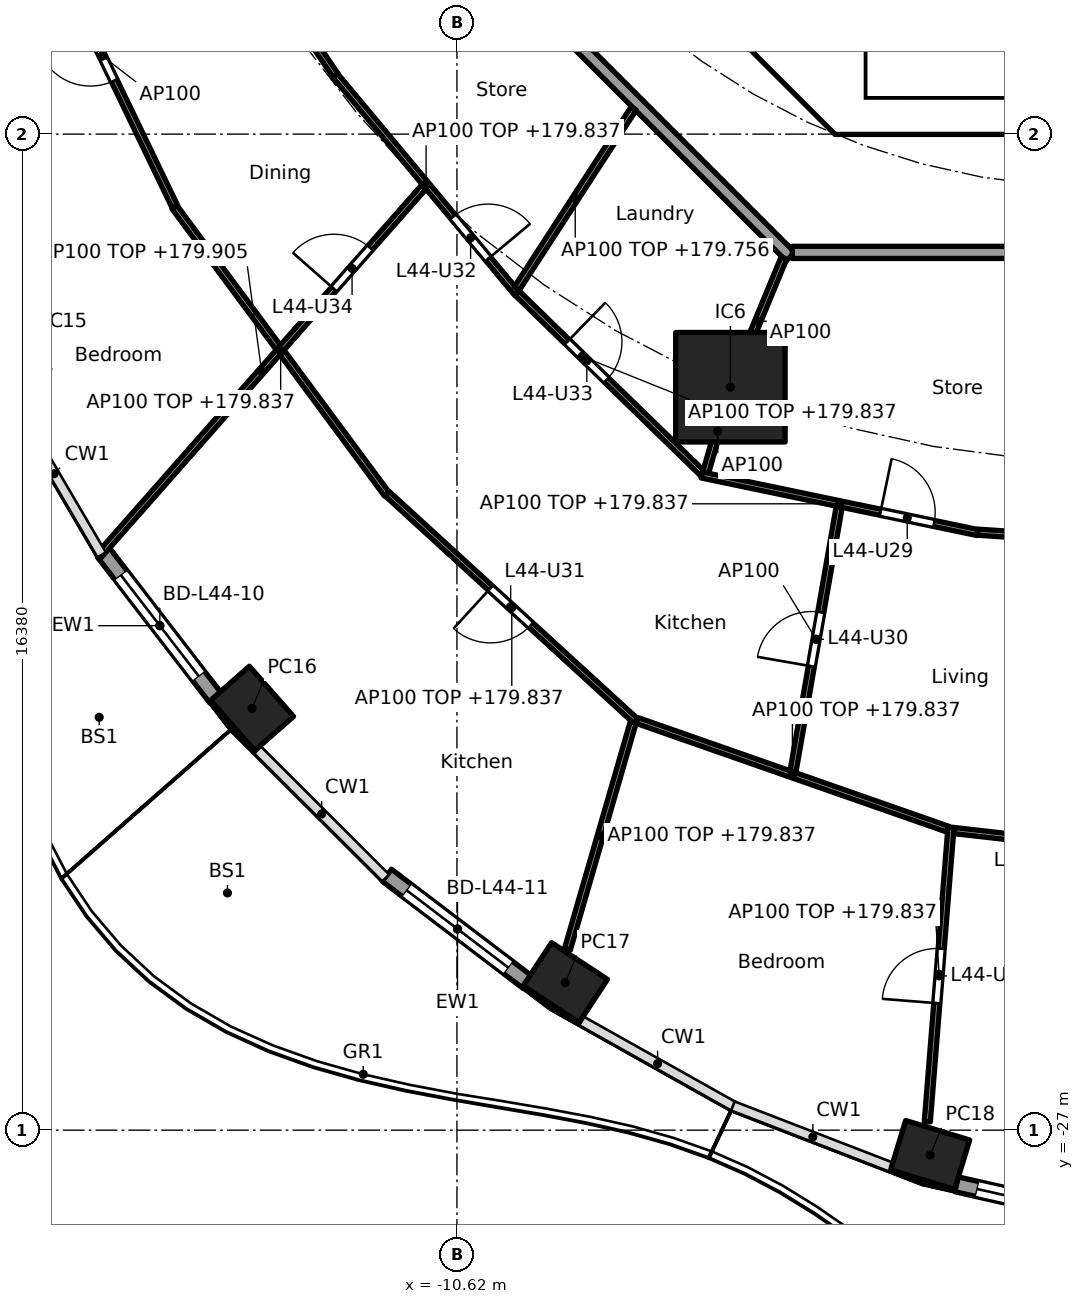
"""IFC4 building model, lengths in metres.
Left out: names, types, materials, properties, quantities, classifications, styles, units other than length and angle.
Written with IfcOpenShell. Run it as: python <this file> out.ifc"""

import sys

from ifc_helpers import new_model, si_unit, direction, frame, frame_2d, origin, origin_2d, place, context, subcontext, project, spatial, polyline, rectangle, hollow_rectangle, outline, extrude, element, fill, save


model = new_model("IFC4")
c1 = context("Model", 3, precision=1e-05, world=origin(), true_north=direction((0.0, 1.0)))
c2 = subcontext(c1, "Body", "Model", "MODEL_VIEW")
j1 = project(units=[si_unit("LENGTHUNIT", "METRE"), si_unit("PLANEANGLEUNIT", "RADIAN")], contexts=[c1])
p1 = place(None, origin())
s1 = spatial("IfcSite", under=j1, at=p1, CompositionType="ELEMENT")
p2 = place(p1, origin())
s2 = spatial("IfcBuilding", under=s1, at=p2, CompositionType="ELEMENT")
p3 = place(p2, frame((0.0, 0.0, 177.0)))
s3 = spatial("IfcBuildingStorey", under=s2, at=p3, CompositionType="ELEMENT", Elevation=177.0)
for number, where, z_axis, x_axis in (
    (1, (-13.989, -20.064, 0.0), (0.0, 0.0, 1.0), (0.66, -0.751, 0.0)),
    (2, (-8.837, -24.573, 0.0), (0.0, 0.0, 1.0), (0.836, -0.549, 0.0)),
    (3, (-2.838, -27.408, 0.0), (0.0, 0.0, 1.0), (0.957, -0.292, 0.0)),
):
    element("IfcColumn", number, at=place(p3, frame(where, z_axis=z_axis, x_axis=x_axis)), inside=s3, PredefinedType="COLUMN", context=c2, shape_type="SweptSolid", body=[
        extrude(hollow_rectangle(XDim=1.1, YDim=0.85, WallThickness=0.036, at=origin_2d()), origin(), (0.0, 0.0, 1.0), 3.7),
    ])
p4 = place(p3, frame((-6.123, -14.782, 0.0), z_axis=(0.0, 0.0, 1.0), x_axis=(1.0, 0.0, 0.0)))
e4 = element("IfcColumn", 4, at=p4, inside=s3, PredefinedType="COLUMN", context=c2, shape_type="SweptSolid", body=[
    extrude(rectangle(XDim=1.8, YDim=1.8, at=origin_2d()), origin(), (0.0, 0.0, 1.0), 3.7),
])
p5 = place(p3, frame((-14.58, -19.906, 0.0), z_axis=(0.0, 0.0, 1.0), x_axis=(-0.610437428894, 0.79206448311, 0.0)))
e5 = element("IfcWall", 5, at=p5, inside=s3, PredefinedType="SOLIDWALL", context=c2, shape_type="SweptSolid", body=[
    extrude(rectangle(XDim=3.035, YDim=0.25, at=frame_2d((1.518, 0.0))), origin(), (0.0, 0.0, 1.0), 3.44),
])
p6 = place(p5, frame((0.468, 0.0, 0.0)))
e6 = element("IfcOpeningElement", 6, at=p6, cuts=e5, PredefinedType="OPENING", context=c2, shape_type="SweptSolid", body=[
    extrude(rectangle(XDim=2.1, YDim=2.4, at=frame_2d((1.05, 1.2))), frame((0.0, 0.135, 0.0), z_axis=(0.0, -1.0, 0.0), x_axis=(1.0, 0.0, 0.0)), (0.0, 0.0, 1.0), 0.27),
])
p7 = place(p3, frame((-9.45, -24.574, 0.0), z_axis=(0.0, 0.0, 1.0), x_axis=(-0.796055733703, 0.60522332146, 0.0)))
e7 = element("IfcWall", 7, at=p7, inside=s3, PredefinedType="SOLIDWALL", context=c2, shape_type="SweptSolid", body=[
    extrude(rectangle(XDim=2.917, YDim=0.25, at=frame_2d((1.458, 0.0))), origin(), (0.0, 0.0, 1.0), 3.44),
])
p8 = place(p7, frame((0.408, 0.0, 0.0)))
e8 = element("IfcOpeningElement", 8, at=p8, cuts=e7, PredefinedType="OPENING", context=c2, shape_type="SweptSolid", body=[
    extrude(rectangle(XDim=2.1, YDim=2.4, at=frame_2d((1.05, 1.2))), frame((0.0, 0.135, 0.0), z_axis=(0.0, -1.0, 0.0), x_axis=(1.0, 0.0, 0.0)), (0.0, 0.0, 1.0), 0.27),
])
p9 = place(p3, frame((0.315, -28.506, 0.0), z_axis=(0.0, 0.0, 1.0), x_axis=(-0.975324329911, 0.220776926974, 0.0)))
e9 = element("IfcWall", 9, at=p9, inside=s3, PredefinedType="SOLIDWALL", context=c2, shape_type="SweptSolid", body=[
    extrude(rectangle(XDim=2.788, YDim=0.25, at=frame_2d((1.394, 0.0))), origin(), (0.0, 0.0, 1.0), 3.44),
])
p10 = place(p9, frame((0.344, 0.0, 0.0)))
e10 = element("IfcOpeningElement", 10, at=p10, cuts=e9, PredefinedType="OPENING", context=c2, shape_type="SweptSolid", body=[
    extrude(rectangle(XDim=2.1, YDim=2.4, at=frame_2d((1.05, 1.2))), frame((0.0, 0.135, 0.0), z_axis=(0.0, -1.0, 0.0), x_axis=(1.0, 0.0, 0.0)), (0.0, 0.0, 1.0), 0.27),
])
p11 = place(p3, frame((-9.988, -4.613, 0.0), z_axis=(0.0, 0.0, 1.0), x_axis=(0.707106781187, -0.707106781187, 0.0)))
e11 = element("IfcWall", 11, at=p11, inside=s3, PredefinedType="SHEAR", context=c2, shape_type="SweptSolid", body=[
    extrude(rectangle(XDim=7.602, YDim=0.6, at=frame_2d((3.801, 0.0))), origin(), (0.0, 0.0, 1.0), 3.44),
])
p12 = place(p11, frame((6.151, 0.0, 0.0)))
e12 = element("IfcOpeningElement", 12, at=p12, cuts=e11, PredefinedType="OPENING", context=c2, shape_type="SweptSolid", body=[
    extrude(rectangle(XDim=1.1, YDim=2.1, at=frame_2d((0.55, 1.05))), frame((0.0, 0.31, 0.0), z_axis=(0.0, -1.0, 0.0), x_axis=(1.0, 0.0, 0.0)), (0.0, 0.0, 1.0), 0.62),
])
p13 = place(p3, origin())
e13 = element("IfcWall", 13, at=p13, inside=s3, PredefinedType="SHEAR", context=c2, shape_type="SweptSolid", body=[
    extrude(outline(polyline([(-4.152, -10.025), (4.152, -10.025), (4.401, -9.776), (4.825, -10.2), (4.401, -10.625), (-4.401, -10.625), (-4.825, -10.2), (-4.401, -9.776), (-4.152, -10.025)])), origin(), (0.0, 0.0, 1.0), 3.44),
])
p14 = place(p3, origin())
e14 = element("IfcWall", 14, at=p14, inside=s3, PredefinedType="SOLIDWALL", context=c2, shape_type="SweptSolid", body=[
    extrude(outline(polyline([(-3.9, -10.025), (-4.1, -10.025), (-4.1, -7.025), (-3.9, -7.025), (-3.9, -10.025)])), origin(), (0.0, 0.0, 1.0), 3.44),
])
p15 = place(p3, frame((-12.635, -5.134, 0.0), z_axis=(0.0, 0.0, 1.0), x_axis=(0.707106781187, -0.707106781187, 0.0)))
e15 = element("IfcWall", 15, at=p15, inside=s3, PredefinedType="PARTITIONING", context=c2, shape_type="SweptSolid", body=[
    extrude(rectangle(XDim=10.609, YDim=0.2, at=frame_2d((5.305, 0.0))), origin(), (0.0, 0.0, 1.0), 3.44),
])
p16 = place(p3, frame((-5.104, -12.565, 0.0), z_axis=(0.0, 0.0, 1.0), x_axis=(1.0, 0.0, 0.0)))
e16 = element("IfcWall", 16, at=p16, inside=s3, PredefinedType="PARTITIONING", context=c2, shape_type="SweptSolid", body=[
    extrude(rectangle(XDim=10.409, YDim=0.2, at=frame_2d((5.205, 0.0))), origin(), (0.0, 0.0, 1.0), 3.44),
])
p17 = place(p16, frame((8.074, 0.0, 0.0)))
e17 = element("IfcOpeningElement", 17, at=p17, cuts=e16, PredefinedType="OPENING", context=c2, shape_type="SweptSolid", body=[
    extrude(rectangle(XDim=1.0, YDim=2.1, at=frame_2d((0.5, 1.05))), frame((0.0, 0.11, 0.0), z_axis=(0.0, -1.0, 0.0), x_axis=(1.0, 0.0, 0.0)), (0.0, 0.0, 1.0), 0.22),
])
p18 = place(p3, frame((-14.924, -6.249, 0.0), z_axis=(0.0, 0.0, 1.0), x_axis=(0.561046521684, -0.82778427172, 0.0)))
e18 = element("IfcWall", 18, at=p18, inside=s3, PredefinedType="PARTITIONING", context=c2, shape_type="SweptSolid", body=[
    extrude(rectangle(XDim=4.109, YDim=0.1, at=frame_2d((2.054, 0.0))), origin(), (0.0, 0.0, 1.0), 3.44),
])
p19 = place(p3, frame((-17.647, -6.854, 0.0), z_axis=(0.0, 0.0, 1.0), x_axis=(0.434027506504, -0.900899619046, 0.0)))
e19 = element("IfcWall", 19, at=p19, inside=s3, PredefinedType="PARTITIONING", context=c2, shape_type="SweptSolid", body=[
    extrude(rectangle(XDim=5.508, YDim=0.1, at=frame_2d((2.754, 0.0))), origin(), (0.0, 0.0, 1.0), 3.44),
])
p20 = place(p19, frame((2.304, 0.0, 0.0)))
e20 = element("IfcOpeningElement", 20, at=p20, cuts=e19, PredefinedType="OPENING", context=c2, shape_type="SweptSolid", body=[
    extrude(rectangle(XDim=0.9, YDim=2.1, at=frame_2d((0.45, 1.05))), frame((0.0, 0.06, 0.0), z_axis=(0.0, -1.0, 0.0), x_axis=(1.0, 0.0, 0.0)), (0.0, 0.0, 1.0), 0.12),
])
p21 = place(p3, frame((-12.623, -9.653, 0.0), z_axis=(0.0, 0.0, 1.0), x_axis=(0.640297481347, -0.768127030758, 0.0)))
e21 = element("IfcWall", 21, at=p21, inside=s3, PredefinedType="PARTITIONING", context=c2, shape_type="SweptSolid", body=[
    extrude(rectangle(XDim=4.672, YDim=0.1, at=frame_2d((2.336, 0.0))), origin(), (0.0, 0.0, 1.0), 2.837),
])
p22 = place(p21, frame((3.029, 0.0, 0.0)))
e22 = element("IfcOpeningElement", 22, at=p22, cuts=e21, PredefinedType="OPENING", context=c2, shape_type="SweptSolid", body=[
    extrude(rectangle(XDim=0.9, YDim=2.1, at=frame_2d((0.45, 1.05))), frame((0.0, 0.06, 0.0), z_axis=(0.0, -1.0, 0.0), x_axis=(1.0, 0.0, 0.0)), (0.0, 0.0, 1.0), 0.12),
])
p23 = place(p3, frame((-15.265, -11.821, 0.0), z_axis=(0.0, 0.0, 1.0), x_axis=(0.594711348772, -0.803939308432, 0.0)))
e23 = element("IfcWall", 23, at=p23, inside=s3, PredefinedType="PARTITIONING", context=c2, shape_type="SweptSolid", body=[
    extrude(rectangle(XDim=5.872, YDim=0.1, at=frame_2d((2.936, 0.0))), origin(), (0.0, 0.0, 1.0), 2.837),
])
p24 = place(p3, frame((-11.16, -11.485, 0.0), z_axis=(0.0, 0.0, 1.0), x_axis=(-0.661275898802, -0.750142776852, 0.0)))
e24 = element("IfcWall", 24, at=p24, inside=s3, PredefinedType="PARTITIONING", context=c2, shape_type="SweptSolid", body=[
    extrude(rectangle(XDim=8.083, YDim=0.1, at=frame_2d((4.041, 0.0))), origin(), (0.0, 0.0, 1.0), 2.905),
])
p25 = place(p24, frame((1.341, 0.0, 0.0)))
e25 = element("IfcOpeningElement", 25, at=p25, cuts=e24, PredefinedType="OPENING", context=c2, shape_type="SweptSolid", body=[
    extrude(rectangle(XDim=0.9, YDim=2.1, at=frame_2d((0.45, 1.05))), frame((0.0, 0.06, 0.0), z_axis=(0.0, -1.0, 0.0), x_axis=(1.0, 0.0, 0.0)), (0.0, 0.0, 1.0), 0.12),
])
p26 = place(p3, frame((-7.712, -10.195, 0.0), z_axis=(0.0, 0.0, 1.0), x_axis=(-0.544170086001, -0.838974920663, 0.0)))
e26 = element("IfcWall", 26, at=p26, inside=s3, PredefinedType="PARTITIONING", context=c2, shape_type="SweptSolid", body=[
    extrude(rectangle(XDim=3.535, YDim=0.1, at=frame_2d((1.768, 0.0))), origin(), (0.0, 0.0, 1.0), 2.756),
])
p27 = place(p3, frame((-9.627, -13.238, 0.0), z_axis=(0.0, 0.0, 1.0), x_axis=(0.716946269374, -0.697128429223, 0.0)))
e27 = element("IfcWall", 27, at=p27, inside=s3, PredefinedType="PARTITIONING", context=c2, shape_type="SweptSolid", body=[
    extrude(rectangle(XDim=4.25, YDim=0.1, at=frame_2d((2.125, 0.0))), origin(), (0.0, 0.0, 1.0), 2.837),
])
p28 = place(p27, frame((1.145, 0.0, 0.0)))
e28 = element("IfcOpeningElement", 28, at=p28, cuts=e27, PredefinedType="OPENING", context=c2, shape_type="SweptSolid", body=[
    extrude(rectangle(XDim=0.9, YDim=2.1, at=frame_2d((0.45, 1.05))), frame((0.0, 0.06, 0.0), z_axis=(0.0, -1.0, 0.0), x_axis=(1.0, 0.0, 0.0)), (0.0, 0.0, 1.0), 0.12),
])
p29 = place(p3, frame((-11.766, -16.535, 0.0), z_axis=(0.0, 0.0, 1.0), x_axis=(0.738053852169, -0.674741810842, 0.0)))
e29 = element("IfcWall", 29, at=p29, inside=s3, PredefinedType="PARTITIONING", context=c2, shape_type="SweptSolid", body=[
    extrude(rectangle(XDim=5.549, YDim=0.1, at=frame_2d((2.774, 0.0))), origin(), (0.0, 0.0, 1.0), 2.837),
])
p30 = place(p29, frame((2.3, 0.0, 0.0)))
e30 = element("IfcOpeningElement", 30, at=p30, cuts=e29, PredefinedType="OPENING", context=c2, shape_type="SweptSolid", body=[
    extrude(rectangle(XDim=0.9, YDim=2.1, at=frame_2d((0.45, 1.05))), frame((0.0, 0.06, 0.0), z_axis=(0.0, -1.0, 0.0), x_axis=(1.0, 0.0, 0.0)), (0.0, 0.0, 1.0), 0.12),
])
p31 = place(p3, frame((-5.243, -12.657, 0.0), z_axis=(0.0, 0.0, 1.0), x_axis=(-0.382719158442, -0.923864733477, 0.0)))
e31 = element("IfcWall", 31, at=p31, inside=s3, PredefinedType="PARTITIONING", context=c2, shape_type="SweptSolid", body=[
    extrude(rectangle(XDim=2.25, YDim=0.1, at=frame_2d((1.125, 0.0))), origin(), (0.0, 0.0, 1.0), 3.44),
])
p32 = place(p3, frame((-6.137, -14.831, 0.0), z_axis=(0.0, 0.0, 1.0), x_axis=(-0.2785069197, -0.960434222464, 0.0)))
e32 = element("IfcWall", 32, at=p32, inside=s3, PredefinedType="PARTITIONING", context=c2, shape_type="SweptSolid", body=[
    extrude(rectangle(XDim=1.413, YDim=0.1, at=frame_2d((0.707, 0.0))), origin(), (0.0, 0.0, 1.0), 3.44),
])
p33 = place(p3, frame((-6.594, -16.226, 0.0), z_axis=(0.0, 0.0, 1.0), x_axis=(0.978899284405, -0.204343316484, 0.0)))
e33 = element("IfcWall", 33, at=p33, inside=s3, PredefinedType="PARTITIONING", context=c2, shape_type="SweptSolid", body=[
    extrude(rectangle(XDim=4.636, YDim=0.1, at=frame_2d((2.318, 0.0))), origin(), (0.0, 0.0, 1.0), 2.837),
])
p34 = place(p33, frame((3.002, 0.0, 0.0)))
e34 = element("IfcOpeningElement", 34, at=p34, cuts=e33, PredefinedType="OPENING", context=c2, shape_type="SweptSolid", body=[
    extrude(rectangle(XDim=0.9, YDim=2.1, at=frame_2d((0.45, 1.05))), frame((0.0, 0.06, 0.0), z_axis=(0.0, -1.0, 0.0), x_axis=(1.0, 0.0, 0.0)), (0.0, 0.0, 1.0), 0.12),
])
p35 = place(p3, frame((-7.721, -20.293, 0.0), z_axis=(0.0, 0.0, 1.0), x_axis=(-0.278445616281, -0.960451997121, 0.0)))
e35 = element("IfcWall", 35, at=p35, inside=s3, PredefinedType="PARTITIONING", context=c2, shape_type="SweptSolid", body=[
    extrude(rectangle(XDim=3.885, YDim=0.1, at=frame_2d((1.942, 0.0))), origin(), (0.0, 0.0, 1.0), 2.837),
])
p36 = place(p3, frame((-7.66, -20.262, 0.0), z_axis=(0.0, 0.0, 1.0), x_axis=(0.943911038661, -0.330199865375, 0.0)))
e36 = element("IfcWall", 36, at=p36, inside=s3, PredefinedType="PARTITIONING", context=c2, shape_type="SweptSolid", body=[
    extrude(rectangle(XDim=5.417, YDim=0.1, at=frame_2d((2.709, 0.0))), origin(), (0.0, 0.0, 1.0), 2.837),
])
p37 = place(p3, frame((-4.333, -16.749, 0.0), z_axis=(0.0, 0.0, 1.0), x_axis=(-0.172053721569, -0.985087568135, 0.0)))
e37 = element("IfcWall", 37, at=p37, inside=s3, PredefinedType="PARTITIONING", context=c2, shape_type="SweptSolid", body=[
    extrude(rectangle(XDim=4.424, YDim=0.1, at=frame_2d((2.212, 0.0))), origin(), (0.0, 0.0, 1.0), 3.44),
])
p38 = place(p37, frame((1.762, 0.0, 0.0)))
e38 = element("IfcOpeningElement", 38, at=p38, cuts=e37, PredefinedType="OPENING", context=c2, shape_type="SweptSolid", body=[
    extrude(rectangle(XDim=0.9, YDim=2.1, at=frame_2d((0.45, 1.05))), frame((0.0, 0.06, 0.0), z_axis=(0.0, -1.0, 0.0), x_axis=(1.0, 0.0, 0.0)), (0.0, 0.0, 1.0), 0.12),
])
p39 = place(p3, frame((-2.055, -17.166, 0.0), z_axis=(0.0, 0.0, 1.0), x_axis=(0.997754717554, -0.066974051687, 0.0)))
e39 = element("IfcWall", 39, at=p39, inside=s3, PredefinedType="PARTITIONING", context=c2, shape_type="SweptSolid", body=[
    extrude(rectangle(XDim=4.309, YDim=0.1, at=frame_2d((2.154, 0.0))), origin(), (0.0, 0.0, 1.0), 2.837),
])
p40 = place(p3, frame((-2.495, -22.017, 0.0), z_axis=(0.0, 0.0, 1.0), x_axis=(-0.080150660566, -0.99678276049, 0.0)))
e40 = element("IfcWall", 40, at=p40, inside=s3, PredefinedType="PARTITIONING", context=c2, shape_type="SweptSolid", body=[
    extrude(rectangle(XDim=4.858, YDim=0.1, at=frame_2d((2.429, 0.0))), origin(), (0.0, 0.0, 1.0), 2.837),
])
p41 = place(p40, frame((2.004, 0.0, 0.0)))
e41 = element("IfcOpeningElement", 41, at=p41, cuts=e40, PredefinedType="OPENING", context=c2, shape_type="SweptSolid", body=[
    extrude(rectangle(XDim=0.9, YDim=2.1, at=frame_2d((0.45, 1.05))), frame((0.0, 0.06, 0.0), z_axis=(0.0, -1.0, 0.0), x_axis=(1.0, 0.0, 0.0)), (0.0, 0.0, 1.0), 0.12),
])
p42 = place(p3, frame((-2.449, -22.073, 0.0), z_axis=(0.0, 0.0, 1.0), x_axis=(0.993660315081, -0.112424099879, 0.0)))
e42 = element("IfcWall", 42, at=p42, inside=s3, PredefinedType="PARTITIONING", context=c2, shape_type="SweptSolid", body=[
    extrude(rectangle(XDim=5.325, YDim=0.1, at=frame_2d((2.662, 0.0))), origin(), (0.0, 0.0, 1.0), 2.837),
])
p43 = place(p42, frame((0.881, 0.0, 0.0)))
e43 = element("IfcOpeningElement", 43, at=p43, cuts=e42, PredefinedType="OPENING", context=c2, shape_type="SweptSolid", body=[
    extrude(rectangle(XDim=0.9, YDim=2.1, at=frame_2d((0.45, 1.05))), frame((0.0, 0.06, 0.0), z_axis=(0.0, -1.0, 0.0), x_axis=(1.0, 0.0, 0.0)), (0.0, 0.0, 1.0), 0.12),
])
p44 = place(p6, origin())
e44 = element("IfcDoor", 44, at=p44, inside=s3, OperationType="SLIDING_TO_LEFT", PredefinedType="DOOR", context=c2, shape_type="SweptSolid", body=[
    extrude(rectangle(XDim=2.1, YDim=2.4, at=frame_2d((1.05, 1.2))), frame((0.0, 0.025, 0.0), z_axis=(0.0, -1.0, 0.0), x_axis=(1.0, 0.0, 0.0)), (0.0, 0.0, 1.0), 0.05),
])
fill(e6, e44)
p45 = place(p8, origin())
e45 = element("IfcDoor", 45, at=p45, inside=s3, OperationType="SLIDING_TO_LEFT", PredefinedType="DOOR", context=c2, shape_type="SweptSolid", body=[
    extrude(rectangle(XDim=2.1, YDim=2.4, at=frame_2d((1.05, 1.2))), frame((0.0, 0.025, 0.0), z_axis=(0.0, -1.0, 0.0), x_axis=(1.0, 0.0, 0.0)), (0.0, 0.0, 1.0), 0.05),
])
fill(e8, e45)
p46 = place(p10, origin())
e46 = element("IfcDoor", 46, at=p46, inside=s3, OperationType="SLIDING_TO_LEFT", PredefinedType="DOOR", context=c2, shape_type="SweptSolid", body=[
    extrude(rectangle(XDim=2.1, YDim=2.4, at=frame_2d((1.05, 1.2))), frame((0.0, 0.025, 0.0), z_axis=(0.0, -1.0, 0.0), x_axis=(1.0, 0.0, 0.0)), (0.0, 0.0, 1.0), 0.05),
])
fill(e10, e46)
p47 = place(p12, origin())
e47 = element("IfcDoor", 47, at=p47, inside=s3, OperationType="SINGLE_SWING_LEFT", PredefinedType="DOOR", context=c2, shape_type="SweptSolid", body=[
    extrude(rectangle(XDim=1.1, YDim=2.1, at=frame_2d((0.55, 1.05))), frame((0.0, 0.025, 0.0), z_axis=(0.0, -1.0, 0.0), x_axis=(1.0, 0.0, 0.0)), (0.0, 0.0, 1.0), 0.05),
])
fill(e12, e47)
p48 = place(p41, frame((0.9, 0.0, 0.0), x_axis=(-1.0, 0.0, 0.0)))
e48 = element("IfcDoor", 48, at=p48, inside=s3, OperationType="SINGLE_SWING_LEFT", PredefinedType="DOOR", context=c2, shape_type="SweptSolid", body=[
    extrude(rectangle(XDim=0.9, YDim=2.1, at=frame_2d((0.45, 1.05))), frame((0.0, 0.025, 0.0), z_axis=(0.0, -1.0, 0.0), x_axis=(1.0, 0.0, 0.0)), (0.0, 0.0, 1.0), 0.05),
])
fill(e41, e48)
p49 = place(p34, origin())
e49 = element("IfcDoor", 49, at=p49, inside=s3, OperationType="SINGLE_SWING_LEFT", PredefinedType="DOOR", context=c2, shape_type="SweptSolid", body=[
    extrude(rectangle(XDim=0.9, YDim=2.1, at=frame_2d((0.45, 1.05))), frame((0.0, 0.025, 0.0), z_axis=(0.0, -1.0, 0.0), x_axis=(1.0, 0.0, 0.0)), (0.0, 0.0, 1.0), 0.05),
])
fill(e34, e49)
p50 = place(p38, frame((0.9, 0.0, 0.0), x_axis=(-1.0, 0.0, 0.0)))
e50 = element("IfcDoor", 50, at=p50, inside=s3, OperationType="SINGLE_SWING_LEFT", PredefinedType="DOOR", context=c2, shape_type="SweptSolid", body=[
    extrude(rectangle(XDim=0.9, YDim=2.1, at=frame_2d((0.45, 1.05))), frame((0.0, 0.025, 0.0), z_axis=(0.0, -1.0, 0.0), x_axis=(1.0, 0.0, 0.0)), (0.0, 0.0, 1.0), 0.05),
])
fill(e38, e50)
p51 = place(p30, frame((0.9, 0.0, 0.0), x_axis=(-1.0, 0.0, 0.0)))
e51 = element("IfcDoor", 51, at=p51, inside=s3, OperationType="SINGLE_SWING_RIGHT", PredefinedType="DOOR", context=c2, shape_type="SweptSolid", body=[
    extrude(rectangle(XDim=0.9, YDim=2.1, at=frame_2d((0.45, 1.05))), frame((0.0, 0.025, 0.0), z_axis=(0.0, -1.0, 0.0), x_axis=(1.0, 0.0, 0.0)), (0.0, 0.0, 1.0), 0.05),
])
fill(e30, e51)
p52 = place(p22, origin())
e52 = element("IfcDoor", 52, at=p52, inside=s3, OperationType="SINGLE_SWING_RIGHT", PredefinedType="DOOR", context=c2, shape_type="SweptSolid", body=[
    extrude(rectangle(XDim=0.9, YDim=2.1, at=frame_2d((0.45, 1.05))), frame((0.0, 0.025, 0.0), z_axis=(0.0, -1.0, 0.0), x_axis=(1.0, 0.0, 0.0)), (0.0, 0.0, 1.0), 0.05),
])
fill(e22, e52)
p53 = place(p28, origin())
e53 = element("IfcDoor", 53, at=p53, inside=s3, OperationType="SINGLE_SWING_LEFT", PredefinedType="DOOR", context=c2, shape_type="SweptSolid", body=[
    extrude(rectangle(XDim=0.9, YDim=2.1, at=frame_2d((0.45, 1.05))), frame((0.0, 0.025, 0.0), z_axis=(0.0, -1.0, 0.0), x_axis=(1.0, 0.0, 0.0)), (0.0, 0.0, 1.0), 0.05),
])
fill(e28, e53)
p54 = place(p25, frame((0.9, 0.0, 0.0), x_axis=(-1.0, 0.0, 0.0)))
e54 = element("IfcDoor", 54, at=p54, inside=s3, OperationType="SINGLE_SWING_LEFT", PredefinedType="DOOR", context=c2, shape_type="SweptSolid", body=[
    extrude(rectangle(XDim=0.9, YDim=2.1, at=frame_2d((0.45, 1.05))), frame((0.0, 0.025, 0.0), z_axis=(0.0, -1.0, 0.0), x_axis=(1.0, 0.0, 0.0)), (0.0, 0.0, 1.0), 0.05),
])
fill(e25, e54)
p55 = place(p20, frame((0.9, 0.0, 0.0), x_axis=(-1.0, 0.0, 0.0)))
e55 = element("IfcDoor", 55, at=p55, inside=s3, OperationType="SINGLE_SWING_RIGHT", PredefinedType="DOOR", context=c2, shape_type="SweptSolid", body=[
    extrude(rectangle(XDim=0.9, YDim=2.1, at=frame_2d((0.45, 1.05))), frame((0.0, 0.025, 0.0), z_axis=(0.0, -1.0, 0.0), x_axis=(1.0, 0.0, 0.0)), (0.0, 0.0, 1.0), 0.05),
])
fill(e20, e55)
save(model, sys.argv[1])
